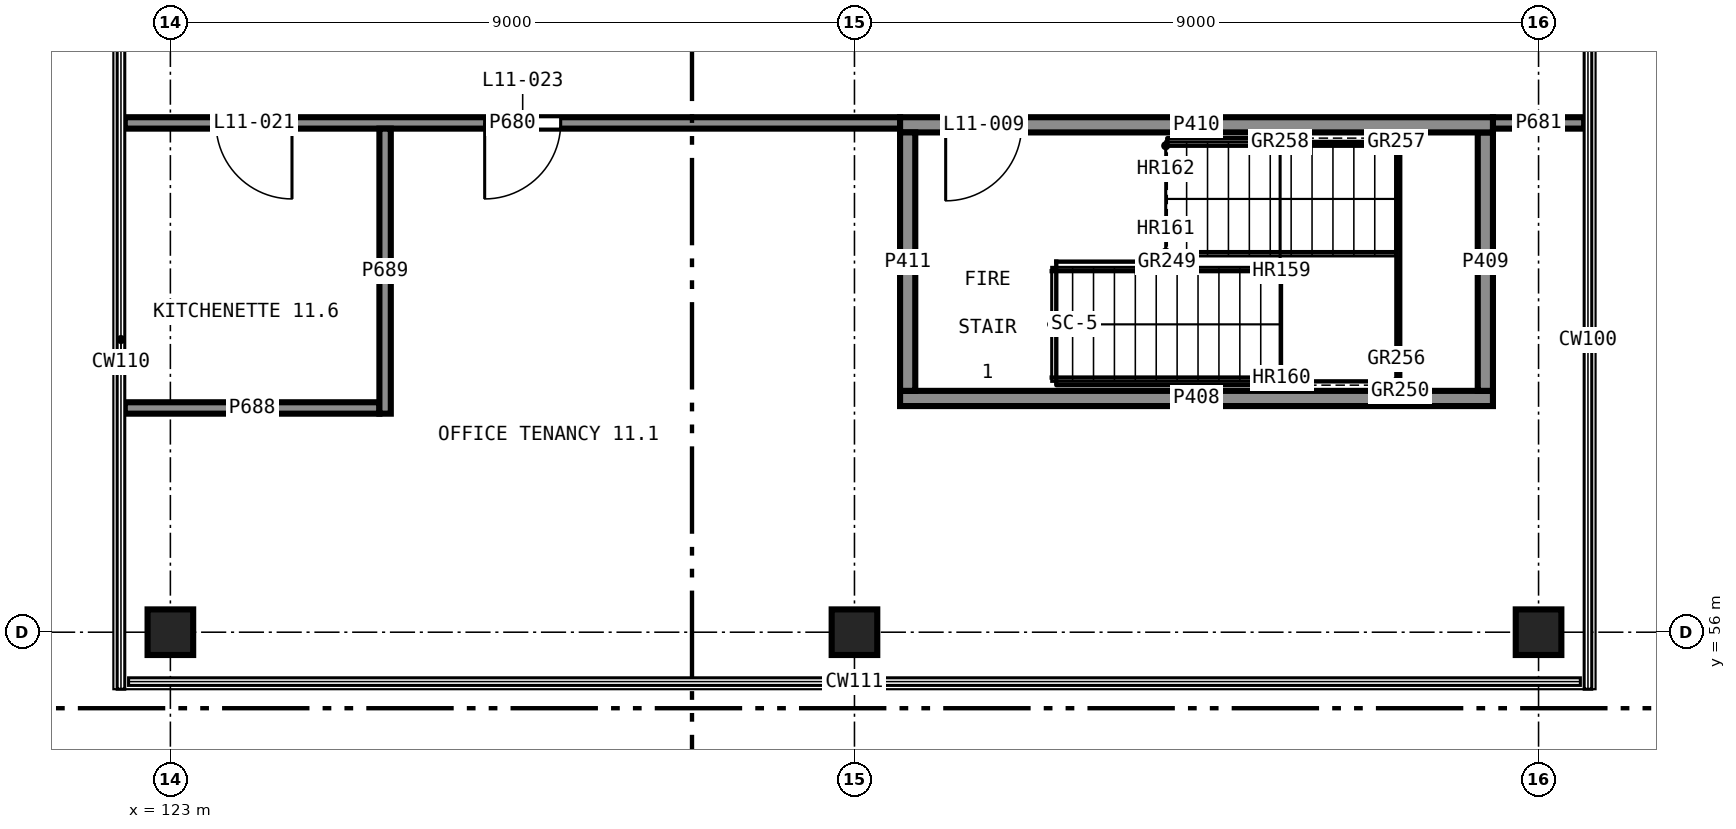
"""IFC4 building model, lengths in metres.
Left out: names, types, materials, properties, quantities, classifications, styles, units other than length and angle.
Written with IfcOpenShell. Run it as: python <this file> out.ifc"""

import sys

from ifc_helpers import new_model, si_unit, direction, frame, frame_2d, origin, origin_2d, place, context, subcontext, project, spatial, rectangle, extrude, element, fill, save


model = new_model("IFC4")
c1 = context("Model", 3, precision=1e-05, world=origin(), true_north=direction((0.0, 1.0)))
c2 = subcontext(c1, "Body", "Model", "MODEL_VIEW")
j1 = project(units=[si_unit("LENGTHUNIT", "METRE"), si_unit("PLANEANGLEUNIT", "RADIAN")], contexts=[c1])
p1 = place(None, origin())
s1 = spatial("IfcSite", under=j1, at=p1, CompositionType="ELEMENT")
p2 = place(p1, origin())
s2 = spatial("IfcBuilding", under=s1, at=p2, CompositionType="ELEMENT")
p3 = place(p2, frame((0.0, 0.0, 45.5)))
s3 = spatial("IfcBuildingStorey", under=s2, at=p3, CompositionType="ELEMENT", Elevation=45.5)
for number, where, z_axis, x_axis in (
    (1, (123.0, 56.0, 0.0), (0.0, 0.0, 1.0), (1.0, 0.0, 0.0)),
    (2, (132.0, 56.0, 0.0), (0.0, 0.0, 1.0), (1.0, 0.0, 0.0)),
    (3, (141.0, 56.0, 0.0), (0.0, 0.0, 1.0), (1.0, 0.0, 0.0)),
):
    element("IfcColumn", number, at=place(p3, frame(where, z_axis=z_axis, x_axis=x_axis)), inside=s3, PredefinedType="COLUMN", context=c2, shape_type="SweptSolid", body=[
        extrude(rectangle(XDim=0.6, YDim=0.6, at=origin_2d()), origin(), (0.0, 0.0, 1.0), 4.0),
    ])
p4 = place(p3, frame((132.6, 59.075, 0.0), z_axis=(0.0, 0.0, 1.0), x_axis=(1.0, 0.0, 0.0)))
e4 = element("IfcWall", 4, at=p4, inside=s3, PredefinedType="SHEAR", context=c2, shape_type="SweptSolid", body=[
    extrude(rectangle(XDim=7.8, YDim=0.2, at=frame_2d((3.9, 0.0))), origin(), (0.0, 0.0, 1.0), 3.75),
])
p5 = place(p3, frame((140.3, 59.175, 0.0), z_axis=(0.0, 0.0, 1.0), x_axis=(0.0, 1.0, 0.0)))
e5 = element("IfcWall", 5, at=p5, inside=s3, PredefinedType="SHEAR", context=c2, shape_type="SweptSolid", body=[
    extrude(rectangle(XDim=3.4, YDim=0.2, at=frame_2d((1.7, 0.0))), origin(), (0.0, 0.0, 1.0), 3.75),
])
p6 = place(p3, frame((140.4, 62.675, 0.0), z_axis=(0.0, 0.0, 1.0), x_axis=(-1.0, 0.0, 0.0)))
e6 = element("IfcWall", 6, at=p6, inside=s3, PredefinedType="SHEAR", context=c2, shape_type="SweptSolid", body=[
    extrude(rectangle(XDim=7.8, YDim=0.2, at=frame_2d((3.9, 0.0))), origin(), (0.0, 0.0, 1.0), 3.75),
])
p7 = place(p6, frame((6.2, 0.0, 0.0)))
e7 = element("IfcOpeningElement", 7, at=p7, cuts=e6, PredefinedType="OPENING", context=c2, shape_type="SweptSolid", body=[
    extrude(rectangle(XDim=1.0, YDim=2.1, at=frame_2d((0.5, 1.05))), frame((0.0, 0.11, 0.0), z_axis=(0.0, -1.0, 0.0), x_axis=(1.0, 0.0, 0.0)), (0.0, 0.0, 1.0), 0.22),
])
p8 = place(p3, frame((132.7, 62.575, 0.0), z_axis=(0.0, 0.0, 1.0), x_axis=(0.0, -1.0, 0.0)))
e8 = element("IfcWall", 8, at=p8, inside=s3, PredefinedType="SHEAR", context=c2, shape_type="SweptSolid", body=[
    extrude(rectangle(XDim=3.4, YDim=0.2, at=frame_2d((1.7, 0.0))), origin(), (0.0, 0.0, 1.0), 3.75),
])
p9 = place(p3, frame((132.6, 62.7, 0.0), z_axis=(0.0, 0.0, 1.0), x_axis=(-1.0, 0.0, 0.0)))
e9 = element("IfcWall", 9, at=p9, inside=s3, PredefinedType="PARTITIONING", context=c2, shape_type="SweptSolid", body=[
    extrude(rectangle(XDim=10.2, YDim=0.15, at=frame_2d((5.1, 0.0))), origin(), (0.0, 0.0, 1.0), 3.75),
])
p10 = place(p9, frame((8.0, 0.0, 0.0)))
e10 = element("IfcOpeningElement", 10, at=p10, cuts=e9, PredefinedType="OPENING", context=c2, shape_type="SweptSolid", body=[
    extrude(rectangle(XDim=1.0, YDim=2.1, at=frame_2d((0.5, 1.05))), frame((0.0, 0.085, 0.0), z_axis=(0.0, -1.0, 0.0), x_axis=(1.0, 0.0, 0.0)), (0.0, 0.0, 1.0), 0.17),
])
p11 = place(p9, frame((4.465, 0.0, 0.0)))
e11 = element("IfcOpeningElement", 11, at=p11, cuts=e9, PredefinedType="OPENING", context=c2, shape_type="SweptSolid", body=[
    extrude(rectangle(XDim=1.0, YDim=2.1, at=frame_2d((0.5, 1.05))), frame((0.0, 0.085, 0.0), z_axis=(0.0, -1.0, 0.0), x_axis=(1.0, 0.0, 0.0)), (0.0, 0.0, 1.0), 0.17),
])
p12 = place(p3, frame((141.6, 62.7, 0.0), z_axis=(0.0, 0.0, 1.0), x_axis=(-1.0, 0.0, 0.0)))
e12 = element("IfcWall", 12, at=p12, inside=s3, PredefinedType="PARTITIONING", context=c2, shape_type="SweptSolid", body=[
    extrude(rectangle(XDim=1.2, YDim=0.15, at=frame_2d((0.6, 0.0))), origin(), (0.0, 0.0, 1.0), 3.75),
])
p13 = place(p3, frame((122.4, 58.95, 0.0), z_axis=(0.0, 0.0, 1.0), x_axis=(1.0, 0.0, 0.0)))
e13 = element("IfcWall", 13, at=p13, inside=s3, PredefinedType="PARTITIONING", context=c2, shape_type="SweptSolid", body=[
    extrude(rectangle(XDim=3.35, YDim=0.15, at=frame_2d((1.675, 0.0))), origin(), (0.0, 0.0, 1.0), 3.75),
])
p14 = place(p3, frame((125.825, 62.625, 0.0), z_axis=(0.0, 0.0, 1.0), x_axis=(0.0, -1.0, 0.0)))
e14 = element("IfcWall", 14, at=p14, inside=s3, PredefinedType="PARTITIONING", context=c2, shape_type="SweptSolid", body=[
    extrude(rectangle(XDim=3.75, YDim=0.15, at=frame_2d((1.875, 0.0))), origin(), (0.0, 0.0, 1.0), 3.75),
])
p15 = place(p7, origin())
e15 = element("IfcDoor", 15, at=p15, inside=s3, OperationType="SINGLE_SWING_LEFT", PredefinedType="DOOR", context=c2, shape_type="SweptSolid", body=[
    extrude(rectangle(XDim=1.0, YDim=2.1, at=frame_2d((0.5, 1.05))), frame((0.0, 0.025, 0.0), z_axis=(0.0, -1.0, 0.0), x_axis=(1.0, 0.0, 0.0)), (0.0, 0.0, 1.0), 0.05),
])
fill(e7, e15)
p16 = place(p10, origin())
e16 = element("IfcDoor", 16, at=p16, inside=s3, OperationType="SINGLE_SWING_RIGHT", PredefinedType="DOOR", context=c2, shape_type="SweptSolid", body=[
    extrude(rectangle(XDim=1.0, YDim=2.1, at=frame_2d((0.5, 1.05))), frame((0.0, 0.025, 0.0), z_axis=(0.0, -1.0, 0.0), x_axis=(1.0, 0.0, 0.0)), (0.0, 0.0, 1.0), 0.05),
])
fill(e10, e16)
p17 = place(p11, origin())
e17 = element("IfcDoor", 17, at=p17, inside=s3, OperationType="SINGLE_SWING_LEFT", PredefinedType="DOOR", context=c2, shape_type="SweptSolid", body=[
    extrude(rectangle(XDim=1.0, YDim=2.1, at=frame_2d((0.5, 1.05))), frame((0.0, 0.025, 0.0), z_axis=(0.0, -1.0, 0.0), x_axis=(1.0, 0.0, 0.0)), (0.0, 0.0, 1.0), 0.05),
])
fill(e11, e17)
save(model, sys.argv[1])
